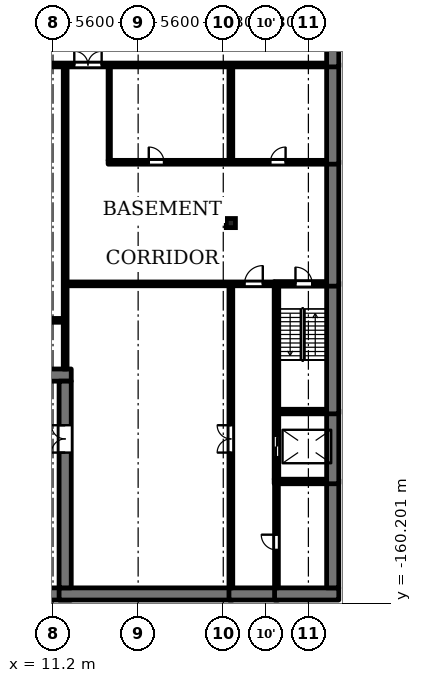
"""IFC4 building model, lengths in metres.
Left out: names, types, materials, properties, quantities, classifications, styles, units other than length and angle.
Written with IfcOpenShell. Run it as: python <this file> out.ifc"""

import sys

from ifc_helpers import new_model, si_unit, direction, frame, frame_2d, origin, origin_2d, place, context, subcontext, project, spatial, rectangle, extrude, element, fill, save


model = new_model("IFC4")
c1 = context("Model", 3, precision=1e-05, world=origin(), true_north=direction((0.0, 1.0)))
c2 = subcontext(c1, "Body", "Model", "MODEL_VIEW")
j1 = project(units=[si_unit("LENGTHUNIT", "METRE"), si_unit("PLANEANGLEUNIT", "RADIAN")], contexts=[c1])
p1 = place(None, origin())
s1 = spatial("IfcSite", under=j1, at=p1, CompositionType="ELEMENT")
p2 = place(p1, origin())
s2 = spatial("IfcBuilding", under=s1, at=p2, CompositionType="ELEMENT")
p3 = place(p2, frame((0.0, 0.0, -4.5)))
s3 = spatial("IfcBuildingStorey", under=s2, at=p3, CompositionType="ELEMENT", Elevation=-4.5)
p4 = place(p3, frame((22.9, -135.2, 0.0), z_axis=(0.0, 0.0, 1.0), x_axis=(1.0, 0.0, 0.0)))
e1 = element("IfcColumn", 1, at=p4, inside=s3, PredefinedType="COLUMN", context=c2, shape_type="SweptSolid", body=[
    extrude(rectangle(XDim=0.6, YDim=0.6, at=origin_2d()), origin(), (0.0, 0.0, 1.0), 4.15),
])
p5 = place(p3, frame((-12.4, -159.6, 0.0), z_axis=(0.0, 0.0, 1.0), x_axis=(1.0, 0.0, 0.0)))
e2 = element("IfcWall", 2, at=p5, inside=s3, PredefinedType="SOLIDWALL", context=c2, shape_type="SweptSolid", body=[
    extrude(rectangle(XDim=24.8, YDim=0.8, at=frame_2d((12.4, 0.0))), origin(), (0.0, 0.0, 1.0), 4.5),
])
p6 = place(p3, frame((11.6, -159.6, 0.0), z_axis=(0.0, 0.0, 1.0), x_axis=(1.0, 0.0, 0.0)))
e3 = element("IfcWall", 3, at=p6, inside=s3, PredefinedType="SOLIDWALL", context=c2, shape_type="SweptSolid", body=[
    extrude(rectangle(XDim=11.425, YDim=0.8, at=frame_2d((5.712, 0.0))), origin(), (0.0, 0.0, 1.0), 4.15),
])
p7 = place(p3, frame((22.775, -159.6, 0.0), z_axis=(0.0, 0.0, 1.0), x_axis=(1.0, 0.0, 0.0)))
e4 = element("IfcWall", 4, at=p7, inside=s3, PredefinedType="SOLIDWALL", context=c2, shape_type="SweptSolid", body=[
    extrude(rectangle(XDim=3.25, YDim=0.8, at=frame_2d((1.625, 0.0))), origin(), (0.0, 0.0, 1.0), 4.15),
])
p8 = place(p3, frame((25.775, -159.6, 0.0), z_axis=(0.0, 0.0, 1.0), x_axis=(1.0, 0.0, 0.0)))
e5 = element("IfcWall", 5, at=p8, inside=s3, PredefinedType="SOLIDWALL", context=c2, shape_type="SweptSolid", body=[
    extrude(rectangle(XDim=4.225, YDim=0.8, at=frame_2d((2.112, 0.0))), origin(), (0.0, 0.0, 1.0), 4.15),
])
p9 = place(p3, frame((25.75, -152.2, 0.0), z_axis=(0.0, 0.0, 1.0), x_axis=(1.0, 0.0, 0.0)))
e6 = element("IfcWall", 6, at=p9, inside=s3, PredefinedType="SOLIDWALL", context=c2, shape_type="SweptSolid", body=[
    extrude(rectangle(XDim=3.45, YDim=0.3, at=frame_2d((1.725, 0.0))), origin(), (0.0, 0.0, 1.0), 4.15),
])
p10 = place(p3, frame((26.05, -147.6, 0.0), z_axis=(0.0, 0.0, 1.0), x_axis=(1.0, 0.0, 0.0)))
e7 = element("IfcWall", 7, at=p10, inside=s3, PredefinedType="SOLIDWALL", context=c2, shape_type="SweptSolid", body=[
    extrude(rectangle(XDim=3.15, YDim=0.3, at=frame_2d((1.575, 0.0))), origin(), (0.0, 0.0, 1.0), 4.15),
])
p11 = place(p3, frame((-12.4, -145.2, 0.0), z_axis=(0.0, 0.0, 1.0), x_axis=(1.0, 0.0, 0.0)))
e8 = element("IfcWall", 8, at=p11, inside=s3, PredefinedType="SOLIDWALL", context=c2, shape_type="SweptSolid", body=[
    extrude(rectangle(XDim=24.8, YDim=0.8, at=frame_2d((12.4, 0.0))), origin(), (0.0, 0.0, 1.0), 4.5),
])
p12 = place(p3, frame((7.0, -141.6, 0.0), z_axis=(0.0, 0.0, 1.0), x_axis=(1.0, 0.0, 0.0)))
e9 = element("IfcWall", 9, at=p12, inside=s3, PredefinedType="SOLIDWALL", context=c2, shape_type="SweptSolid", body=[
    extrude(rectangle(XDim=4.875, YDim=0.25, at=frame_2d((2.438, 0.0))), origin(), (0.0, 0.0, 1.0), 3.2),
])
p13 = place(p12, frame((2.0, 0.0, 0.0)))
e10 = element("IfcOpeningElement", 10, at=p13, cuts=e9, PredefinedType="OPENING", context=c2, shape_type="SweptSolid", body=[
    extrude(rectangle(XDim=1.0, YDim=2.1, at=frame_2d((0.5, 1.05))), frame((0.0, 0.135, 0.0), z_axis=(0.0, -1.0, 0.0), x_axis=(1.0, 0.0, 0.0)), (0.0, 0.0, 1.0), 0.27),
])
p14 = place(p3, frame((12.125, -139.2, 0.0), z_axis=(0.0, 0.0, 1.0), x_axis=(1.0, 0.0, 0.0)))
e11 = element("IfcWall", 11, at=p14, inside=s3, PredefinedType="SOLIDWALL", context=c2, shape_type="SweptSolid", body=[
    extrude(rectangle(XDim=13.625, YDim=0.25, at=frame_2d((6.812, 0.0))), origin(), (0.0, 0.0, 1.0), 4.15),
])
p15 = place(p14, frame((11.675, 0.0, 0.0)))
e12 = element("IfcOpeningElement", 12, at=p15, cuts=e11, PredefinedType="OPENING", context=c2, shape_type="SweptSolid", body=[
    extrude(rectangle(XDim=1.2, YDim=2.1, at=frame_2d((0.6, 1.05))), frame((0.0, 0.135, 0.0), z_axis=(0.0, -1.0, 0.0), x_axis=(1.0, 0.0, 0.0)), (0.0, 0.0, 1.0), 0.27),
])
p16 = place(p3, frame((25.75, -139.2, 0.0), z_axis=(0.0, 0.0, 1.0), x_axis=(1.0, 0.0, 0.0)))
e13 = element("IfcWall", 13, at=p16, inside=s3, PredefinedType="SOLIDWALL", context=c2, shape_type="SweptSolid", body=[
    extrude(rectangle(XDim=3.45, YDim=0.3, at=frame_2d((1.725, 0.0))), origin(), (0.0, 0.0, 1.0), 4.15),
])
p17 = place(p16, frame((1.4, 0.0, 0.0)))
e14 = element("IfcOpeningElement", 14, at=p17, cuts=e13, PredefinedType="OPENING", context=c2, shape_type="SweptSolid", body=[
    extrude(rectangle(XDim=1.1, YDim=2.1, at=frame_2d((0.55, 1.05))), frame((0.0, 0.16, 0.0), z_axis=(0.0, -1.0, 0.0), x_axis=(1.0, 0.0, 0.0)), (0.0, 0.0, 1.0), 0.32),
])
p18 = place(p3, frame((14.825, -131.2, 0.0), z_axis=(0.0, 0.0, 1.0), x_axis=(1.0, 0.0, 0.0)))
e15 = element("IfcWall", 15, at=p18, inside=s3, PredefinedType="SOLIDWALL", context=c2, shape_type="SweptSolid", body=[
    extrude(rectangle(XDim=14.375, YDim=0.25, at=frame_2d((7.188, 0.0))), origin(), (0.0, 0.0, 1.0), 4.15),
])
p19 = place(p18, frame((2.675, 0.0, 0.0)))
e16 = element("IfcOpeningElement", 16, at=p19, cuts=e15, PredefinedType="OPENING", context=c2, shape_type="SweptSolid", body=[
    extrude(rectangle(XDim=1.0, YDim=2.1, at=frame_2d((0.5, 1.05))), frame((0.0, 0.135, 0.0), z_axis=(0.0, -1.0, 0.0), x_axis=(1.0, 0.0, 0.0)), (0.0, 0.0, 1.0), 0.27),
])
p20 = place(p18, frame((10.675, 0.0, 0.0)))
e17 = element("IfcOpeningElement", 17, at=p20, cuts=e15, PredefinedType="OPENING", context=c2, shape_type="SweptSolid", body=[
    extrude(rectangle(XDim=1.0, YDim=2.1, at=frame_2d((0.5, 1.05))), frame((0.0, 0.135, 0.0), z_axis=(0.0, -1.0, 0.0), x_axis=(1.0, 0.0, 0.0)), (0.0, 0.0, 1.0), 0.27),
])
p21 = place(p3, frame((3.925, -124.8, 0.0), z_axis=(0.0, 0.0, 1.0), x_axis=(1.0, 0.0, 0.0)))
e18 = element("IfcWall", 18, at=p21, inside=s3, PredefinedType="SOLIDWALL", context=c2, shape_type="SweptSolid", body=[
    extrude(rectangle(XDim=25.275, YDim=0.25, at=frame_2d((12.637, 0.0))), origin(), (0.0, 0.0, 1.0), 4.15),
])
p22 = place(p21, frame((8.675, 0.0, 0.0)))
e19 = element("IfcOpeningElement", 19, at=p22, cuts=e18, PredefinedType="OPENING", context=c2, shape_type="SweptSolid", body=[
    extrude(rectangle(XDim=1.8, YDim=2.1, at=frame_2d((0.9, 1.05))), frame((0.0, 0.135, 0.0), z_axis=(0.0, -1.0, 0.0), x_axis=(1.0, 0.0, 0.0)), (0.0, 0.0, 1.0), 0.27),
])
p23 = place(p21, frame((3.575, 0.0, 0.0)))
e20 = element("IfcOpeningElement", 20, at=p23, cuts=e18, PredefinedType="OPENING", context=c2, shape_type="SweptSolid", body=[
    extrude(rectangle(XDim=1.0, YDim=2.1, at=frame_2d((0.5, 1.05))), frame((0.0, 0.135, 0.0), z_axis=(0.0, -1.0, 0.0), x_axis=(1.0, 0.0, 0.0)), (0.0, 0.0, 1.0), 0.27),
])
p24 = place(p3, frame((12.0, -159.2, 0.0), z_axis=(0.0, 0.0, 1.0), x_axis=(0.0, 1.0, 0.0)))
e21 = element("IfcWall", 21, at=p24, inside=s3, PredefinedType="SOLIDWALL", context=c2, shape_type="SweptSolid", body=[
    extrude(rectangle(XDim=13.6, YDim=0.8, at=frame_2d((6.8, 0.0))), origin(), (0.0, 0.0, 1.0), 4.5),
])
p25 = place(p24, frame((8.9, 0.0, 0.0)))
e22 = element("IfcOpeningElement", 22, at=p25, cuts=e21, PredefinedType="OPENING", context=c2, shape_type="SweptSolid", body=[
    extrude(rectangle(XDim=1.8, YDim=2.1, at=frame_2d((0.9, 1.05))), frame((0.0, 0.41, 0.0), z_axis=(0.0, -1.0, 0.0), x_axis=(1.0, 0.0, 0.0)), (0.0, 0.0, 1.0), 0.82),
])
p26 = place(p3, frame((12.0, -144.8, 0.0), z_axis=(0.0, 0.0, 1.0), x_axis=(0.0, 1.0, 0.0)))
e23 = element("IfcWall", 23, at=p26, inside=s3, PredefinedType="SOLIDWALL", context=c2, shape_type="SweptSolid", body=[
    extrude(rectangle(XDim=19.875, YDim=0.25, at=frame_2d((9.938, 0.0))), origin(), (0.0, 0.0, 1.0), 4.15),
])
p27 = place(p3, frame((14.9, -131.075, 0.0), z_axis=(0.0, 0.0, 1.0), x_axis=(0.0, 1.0, 0.0)))
e24 = element("IfcWall", 24, at=p27, inside=s3, PredefinedType="PARTITIONING", context=c2, shape_type="SweptSolid", body=[
    extrude(rectangle(XDim=6.15, YDim=0.15, at=frame_2d((3.075, 0.0))), origin(), (0.0, 0.0, 1.0), 4.15),
])
p28 = place(p3, frame((22.9, -159.2, 0.0), z_axis=(0.0, 0.0, 1.0), x_axis=(0.0, 1.0, 0.0)))
e25 = element("IfcWall", 25, at=p28, inside=s3, PredefinedType="SOLIDWALL", context=c2, shape_type="SweptSolid", body=[
    extrude(rectangle(XDim=19.875, YDim=0.25, at=frame_2d((9.938, 0.0))), origin(), (0.0, 0.0, 1.0), 4.15),
])
p29 = place(p28, frame((8.9, 0.0, 0.0)))
e26 = element("IfcOpeningElement", 26, at=p29, cuts=e25, PredefinedType="OPENING", context=c2, shape_type="SweptSolid", body=[
    extrude(rectangle(XDim=1.8, YDim=2.1, at=frame_2d((0.9, 1.05))), frame((0.0, 0.135, 0.0), z_axis=(0.0, -1.0, 0.0), x_axis=(1.0, 0.0, 0.0)), (0.0, 0.0, 1.0), 0.27),
])
p30 = place(p3, frame((22.9, -131.075, 0.0), z_axis=(0.0, 0.0, 1.0), x_axis=(0.0, 1.0, 0.0)))
e27 = element("IfcWall", 27, at=p30, inside=s3, PredefinedType="SOLIDWALL", context=c2, shape_type="SweptSolid", body=[
    extrude(rectangle(XDim=6.15, YDim=0.25, at=frame_2d((3.075, 0.0))), origin(), (0.0, 0.0, 1.0), 4.15),
])
p31 = place(p3, frame((25.9, -159.2, 0.0), z_axis=(0.0, 0.0, 1.0), x_axis=(0.0, 1.0, 0.0)))
e28 = element("IfcWall", 28, at=p31, inside=s3, PredefinedType="SOLIDWALL", context=c2, shape_type="SweptSolid", body=[
    extrude(rectangle(XDim=6.85, YDim=0.25, at=frame_2d((3.425, 0.0))), origin(), (0.0, 0.0, 1.0), 4.15),
])
p32 = place(p31, frame((2.5, 0.0, 0.0)))
e29 = element("IfcOpeningElement", 29, at=p32, cuts=e28, PredefinedType="OPENING", context=c2, shape_type="SweptSolid", body=[
    extrude(rectangle(XDim=1.0, YDim=2.1, at=frame_2d((0.5, 1.05))), frame((0.0, 0.135, 0.0), z_axis=(0.0, -1.0, 0.0), x_axis=(1.0, 0.0, 0.0)), (0.0, 0.0, 1.0), 0.27),
])
p33 = place(p3, frame((25.9, -152.05, 0.0), z_axis=(0.0, 0.0, 1.0), x_axis=(0.0, 1.0, 0.0)))
e30 = element("IfcWall", 30, at=p33, inside=s3, PredefinedType="SOLIDWALL", context=c2, shape_type="SweptSolid", body=[
    extrude(rectangle(XDim=12.825, YDim=0.3, at=frame_2d((6.413, 0.0))), origin(), (0.0, 0.0, 1.0), 4.15),
])
p34 = place(p33, frame((1.45, 0.0, 0.0)))
e31 = element("IfcOpeningElement", 31, at=p34, cuts=e30, PredefinedType="OPENING", context=c2, shape_type="SweptSolid", body=[
    extrude(rectangle(XDim=1.4, YDim=2.2, at=frame_2d((0.7, 1.1))), frame((0.0, 0.16, 0.0), z_axis=(0.0, -1.0, 0.0), x_axis=(1.0, 0.0, 0.0)), (0.0, 0.0, 1.0), 0.32),
])
p35 = place(p3, frame((29.6, -152.05, 0.0), z_axis=(0.0, 0.0, 1.0), x_axis=(0.0, -1.0, 0.0)))
e32 = element("IfcWall", 32, at=p35, inside=s3, PredefinedType="SOLIDWALL", context=c2, shape_type="SweptSolid", body=[
    extrude(rectangle(XDim=7.15, YDim=0.8, at=frame_2d((3.575, 0.0))), origin(), (0.0, 0.0, 1.0), 4.15),
])
p36 = place(p3, frame((29.6, -147.45, 0.0), z_axis=(0.0, 0.0, 1.0), x_axis=(0.0, -1.0, 0.0)))
e33 = element("IfcWall", 33, at=p36, inside=s3, PredefinedType="SOLIDWALL", context=c2, shape_type="SweptSolid", body=[
    extrude(rectangle(XDim=4.9, YDim=0.8, at=frame_2d((2.45, 0.0))), origin(), (0.0, 0.0, 1.0), 4.15),
])
p37 = place(p3, frame((29.6, -139.05, 0.0), z_axis=(0.0, 0.0, 1.0), x_axis=(0.0, -1.0, 0.0)))
e34 = element("IfcWall", 34, at=p37, inside=s3, PredefinedType="SOLIDWALL", context=c2, shape_type="SweptSolid", body=[
    extrude(rectangle(XDim=8.7, YDim=0.8, at=frame_2d((4.35, 0.0))), origin(), (0.0, 0.0, 1.0), 4.15),
])
p38 = place(p3, frame((29.6, -131.075, 0.0), z_axis=(0.0, 0.0, 1.0), x_axis=(0.0, -1.0, 0.0)))
e35 = element("IfcWall", 35, at=p38, inside=s3, PredefinedType="SOLIDWALL", context=c2, shape_type="SweptSolid", body=[
    extrude(rectangle(XDim=8.275, YDim=0.8, at=frame_2d((4.137, 0.0))), origin(), (0.0, 0.0, 1.0), 4.15),
])
p39 = place(p3, frame((29.6, -124.675, 0.0), z_axis=(0.0, 0.0, 1.0), x_axis=(0.0, -1.0, 0.0)))
e36 = element("IfcWall", 36, at=p39, inside=s3, PredefinedType="SOLIDWALL", context=c2, shape_type="SweptSolid", body=[
    extrude(rectangle(XDim=6.65, YDim=0.8, at=frame_2d((3.325, 0.0))), origin(), (0.0, 0.0, 1.0), 4.15),
])
p40 = place(p3, frame((29.6, -121.05, 0.0), z_axis=(0.0, 0.0, 1.0), x_axis=(0.0, -1.0, 0.0)))
e37 = element("IfcWall", 37, at=p40, inside=s3, PredefinedType="SOLIDWALL", context=c2, shape_type="SweptSolid", body=[
    extrude(rectangle(XDim=3.875, YDim=0.8, at=frame_2d((1.938, 0.0))), origin(), (0.0, 0.0, 1.0), 4.15),
])
p41 = place(p34, origin())
e38 = element("IfcDoor", 38, at=p41, inside=s3, OperationType="DOUBLE_DOOR_SLIDING", PredefinedType="DOOR", context=c2, shape_type="SweptSolid", body=[
    extrude(rectangle(XDim=1.4, YDim=2.2, at=frame_2d((0.7, 1.1))), frame((0.0, 0.025, 0.0), z_axis=(0.0, -1.0, 0.0), x_axis=(1.0, 0.0, 0.0)), (0.0, 0.0, 1.0), 0.05),
])
fill(e31, e38)
p42 = place(p17, origin())
e39 = element("IfcDoor", 39, at=p42, inside=s3, OperationType="SINGLE_SWING_LEFT", PredefinedType="DOOR", context=c2, shape_type="SweptSolid", body=[
    extrude(rectangle(XDim=1.1, YDim=2.1, at=frame_2d((0.55, 1.05))), frame((0.0, 0.025, 0.0), z_axis=(0.0, -1.0, 0.0), x_axis=(1.0, 0.0, 0.0)), (0.0, 0.0, 1.0), 0.05),
])
fill(e14, e39)
p43 = place(p22, origin())
e40 = element("IfcDoor", 40, at=p43, inside=s3, OperationType="DOUBLE_DOOR_SINGLE_SWING", PredefinedType="DOOR", context=c2, shape_type="SweptSolid", body=[
    extrude(rectangle(XDim=1.8, YDim=2.1, at=frame_2d((0.9, 1.05))), frame((0.0, 0.025, 0.0), z_axis=(0.0, -1.0, 0.0), x_axis=(1.0, 0.0, 0.0)), (0.0, 0.0, 1.0), 0.05),
])
fill(e19, e40)
p44 = place(p19, origin())
e41 = element("IfcDoor", 41, at=p44, inside=s3, OperationType="SINGLE_SWING_LEFT", PredefinedType="DOOR", context=c2, shape_type="SweptSolid", body=[
    extrude(rectangle(XDim=1.0, YDim=2.1, at=frame_2d((0.5, 1.05))), frame((0.0, 0.025, 0.0), z_axis=(0.0, -1.0, 0.0), x_axis=(1.0, 0.0, 0.0)), (0.0, 0.0, 1.0), 0.05),
])
fill(e16, e41)
p45 = place(p20, origin())
e42 = element("IfcDoor", 42, at=p45, inside=s3, OperationType="SINGLE_SWING_RIGHT", PredefinedType="DOOR", context=c2, shape_type="SweptSolid", body=[
    extrude(rectangle(XDim=1.0, YDim=2.1, at=frame_2d((0.5, 1.05))), frame((0.0, 0.025, 0.0), z_axis=(0.0, -1.0, 0.0), x_axis=(1.0, 0.0, 0.0)), (0.0, 0.0, 1.0), 0.05),
])
fill(e17, e42)
p46 = place(p15, origin())
e43 = element("IfcDoor", 43, at=p46, inside=s3, OperationType="SINGLE_SWING_RIGHT", PredefinedType="DOOR", context=c2, shape_type="SweptSolid", body=[
    extrude(rectangle(XDim=1.2, YDim=2.1, at=frame_2d((0.6, 1.05))), frame((0.0, 0.025, 0.0), z_axis=(0.0, -1.0, 0.0), x_axis=(1.0, 0.0, 0.0)), (0.0, 0.0, 1.0), 0.05),
])
fill(e12, e43)
p47 = place(p29, origin())
e44 = element("IfcDoor", 44, at=p47, inside=s3, OperationType="DOUBLE_DOOR_SINGLE_SWING", PredefinedType="DOOR", context=c2, shape_type="SweptSolid", body=[
    extrude(rectangle(XDim=1.8, YDim=2.1, at=frame_2d((0.9, 1.05))), frame((0.0, 0.025, 0.0), z_axis=(0.0, -1.0, 0.0), x_axis=(1.0, 0.0, 0.0)), (0.0, 0.0, 1.0), 0.05),
])
fill(e26, e44)
p48 = place(p32, origin())
e45 = element("IfcDoor", 45, at=p48, inside=s3, OperationType="SINGLE_SWING_RIGHT", PredefinedType="DOOR", context=c2, shape_type="SweptSolid", body=[
    extrude(rectangle(XDim=1.0, YDim=2.1, at=frame_2d((0.5, 1.05))), frame((0.0, 0.025, 0.0), z_axis=(0.0, -1.0, 0.0), x_axis=(1.0, 0.0, 0.0)), (0.0, 0.0, 1.0), 0.05),
])
fill(e29, e45)
p49 = place(p25, origin())
e46 = element("IfcDoor", 46, at=p49, inside=s3, OperationType="DOUBLE_DOOR_SINGLE_SWING", PredefinedType="DOOR", context=c2, shape_type="SweptSolid", body=[
    extrude(rectangle(XDim=1.8, YDim=2.1, at=frame_2d((0.9, 1.05))), frame((0.0, 0.025, 0.0), z_axis=(0.0, -1.0, 0.0), x_axis=(1.0, 0.0, 0.0)), (0.0, 0.0, 1.0), 0.05),
])
fill(e22, e46)
save(model, sys.argv[1])
